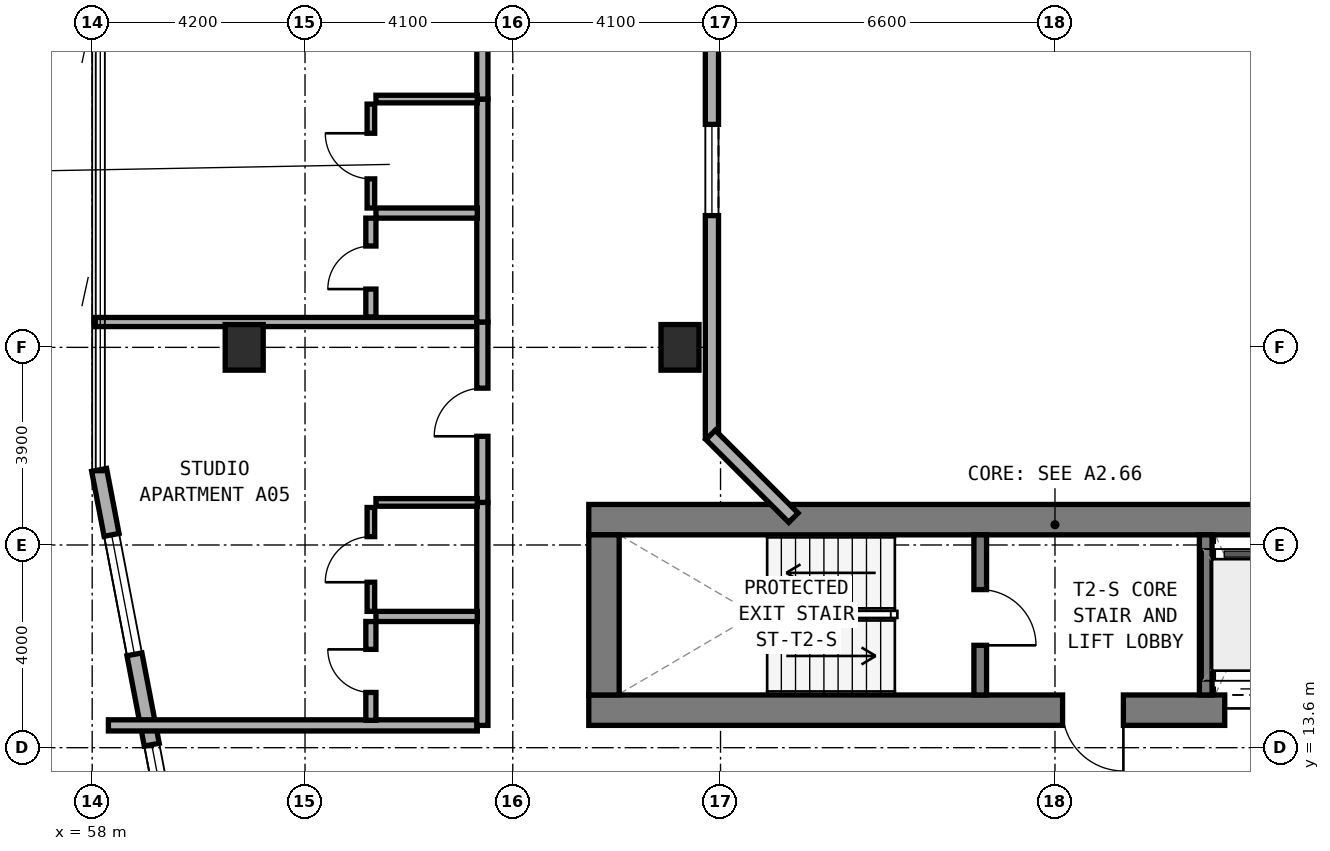
"""IFC4 building model, lengths in metres.
Left out: names, types, materials, properties, quantities, classifications, styles, units other than length and angle.
Written with IfcOpenShell. Run it as: python <this file> out.ifc"""

import sys

from ifc_helpers import new_model, si_unit, direction, frame, frame_2d, origin, origin_2d, place, context, subcontext, project, spatial, rectangle, extrude, element, fill, save


model = new_model("IFC4")
c1 = context("Model", 3, precision=1e-05, world=origin(), true_north=direction((0.0, 1.0)))
c2 = subcontext(c1, "Body", "Model", "MODEL_VIEW")
j1 = project(units=[si_unit("LENGTHUNIT", "METRE"), si_unit("PLANEANGLEUNIT", "RADIAN")], contexts=[c1])
p1 = place(None, origin())
s1 = spatial("IfcSite", under=j1, at=p1, CompositionType="ELEMENT")
p2 = place(p1, origin())
s2 = spatial("IfcBuilding", under=s1, at=p2, CompositionType="ELEMENT")
p3 = place(p2, frame((0.0, 0.0, 48.5)))
s3 = spatial("IfcBuildingStorey", under=s2, at=p3, CompositionType="ELEMENT", Elevation=48.5)
p4 = place(p3, frame((67.8, 14.34, 0.0), z_axis=(0.0, 0.0, 1.0), x_axis=(1.0, 0.0, 0.0)))
e1 = element("IfcWall", 1, at=p4, inside=s3, PredefinedType="SHEAR", context=c2, shape_type="SweptSolid", body=[
    extrude(rectangle(XDim=18.6, YDim=0.6, at=frame_2d((9.3, 0.0))), origin(), (0.0, 0.0, 1.0), 3.5),
])
p5 = place(p4, frame((9.35, 0.0, 0.0)))
e2 = element("IfcOpeningElement", 2, at=p5, cuts=e1, PredefinedType="OPENING", context=c2, shape_type="SweptSolid", body=[
    extrude(rectangle(XDim=1.2, YDim=2.15, at=frame_2d((0.6, 1.075))), frame((0.0, 0.31, 0.0), z_axis=(0.0, -1.0, 0.0), x_axis=(1.0, 0.0, 0.0)), (0.0, 0.0, 1.0), 0.62),
])
p6 = place(p4, frame((16.95, 0.0, 0.0)))
e3 = element("IfcOpeningElement", 3, at=p6, cuts=e1, PredefinedType="OPENING", context=c2, shape_type="SweptSolid", body=[
    extrude(rectangle(XDim=0.85, YDim=2.1, at=frame_2d((0.425, 1.05))), frame((0.0, 0.31, 0.0), z_axis=(0.0, -1.0, 0.0), x_axis=(1.0, 0.0, 0.0)), (0.0, 0.0, 1.0), 0.62),
])
p7 = place(p4, frame((12.55, 0.0, 0.0)))
e4 = element("IfcOpeningElement", 4, at=p7, cuts=e1, PredefinedType="OPENING", context=c2, shape_type="SweptSolid", body=[
    extrude(rectangle(XDim=1.1, YDim=2.15, at=frame_2d((0.55, 1.075))), frame((0.0, 0.31, 0.0), z_axis=(0.0, -1.0, 0.0), x_axis=(1.0, 0.0, 0.0)), (0.0, 0.0, 1.0), 0.62),
])
p8 = place(p4, frame((14.15, 0.0, 0.0)))
e5 = element("IfcOpeningElement", 5, at=p8, cuts=e1, PredefinedType="OPENING", context=c2, shape_type="SweptSolid", body=[
    extrude(rectangle(XDim=1.1, YDim=2.15, at=frame_2d((0.55, 1.075))), frame((0.0, 0.31, 0.0), z_axis=(0.0, -1.0, 0.0), x_axis=(1.0, 0.0, 0.0)), (0.0, 0.0, 1.0), 0.62),
])
p9 = place(p3, frame((67.8, 18.1, 0.0), z_axis=(0.0, 0.0, 1.0), x_axis=(1.0, 0.0, 0.0)))
e6 = element("IfcWall", 6, at=p9, inside=s3, PredefinedType="SHEAR", context=c2, shape_type="SweptSolid", body=[
    extrude(rectangle(XDim=18.6, YDim=0.6, at=frame_2d((9.3, 0.0))), origin(), (0.0, 0.0, 1.0), 3.5),
])
p10 = place(p3, frame((68.1, 14.64, 0.0), z_axis=(0.0, 0.0, 1.0), x_axis=(0.0, 1.0, 0.0)))
e7 = element("IfcWall", 7, at=p10, inside=s3, PredefinedType="SHEAR", context=c2, shape_type="SweptSolid", body=[
    extrude(rectangle(XDim=3.16, YDim=0.6, at=frame_2d((1.58, 0.0))), origin(), (0.0, 0.0, 1.0), 3.5),
])
p11 = place(p3, frame((75.525, 14.64, 0.0), z_axis=(0.0, 0.0, 1.0), x_axis=(0.0, 1.0, 0.0)))
e8 = element("IfcWall", 8, at=p11, inside=s3, PredefinedType="STANDARD", context=c2, shape_type="SweptSolid", body=[
    extrude(rectangle(XDim=3.16, YDim=0.25, at=frame_2d((1.58, 0.0))), origin(), (0.0, 0.0, 1.0), 3.25),
])
p12 = place(p11, frame((0.98, 0.0, 0.0)))
e9 = element("IfcOpeningElement", 9, at=p12, cuts=e8, PredefinedType="OPENING", context=c2, shape_type="SweptSolid", body=[
    extrude(rectangle(XDim=1.1, YDim=2.15, at=frame_2d((0.55, 1.075))), frame((0.0, 0.135, 0.0), z_axis=(0.0, -1.0, 0.0), x_axis=(1.0, 0.0, 0.0)), (0.0, 0.0, 1.0), 0.27),
])
p13 = place(p3, frame((79.975, 14.64, 0.0), z_axis=(0.0, 0.0, 1.0), x_axis=(0.0, 1.0, 0.0)))
e10 = element("IfcWall", 10, at=p13, inside=s3, PredefinedType="STANDARD", context=c2, shape_type="SweptSolid", body=[
    extrude(rectangle(XDim=3.16, YDim=0.25, at=frame_2d((1.58, 0.0))), origin(), (0.0, 0.0, 1.0), 3.25),
])
for number, where, z_axis, x_axis in (
    (11, (61.0, 21.5, 0.0), (0.0, 0.0, 1.0), (1.0, 0.0, 0.0)),
    (12, (69.6, 21.5, 0.0), (0.0, 0.0, 1.0), (1.0, 0.0, 0.0)),
):
    element("IfcColumn", number, at=place(p3, frame(where, z_axis=z_axis, x_axis=x_axis)), inside=s3, PredefinedType="COLUMN", context=c2, shape_type="SweptSolid", body=[
        extrude(rectangle(XDim=0.75, YDim=0.9, at=origin_2d()), origin(), (0.0, 0.0, 1.0), 3.5),
    ])
p14 = place(p3, frame((58.137, 19.082, 0.0), z_axis=(0.0, 0.0, 1.0), x_axis=(0.188087874316, -0.982152203854, 0.0)))
e13 = element("IfcWall", 13, at=p14, inside=s3, PredefinedType="STANDARD", context=c2, shape_type="SweptSolid", body=[
    extrude(rectangle(XDim=9.634, YDim=0.3, at=frame_2d((4.817, 0.0))), origin(), (0.0, 0.0, 1.0), 3.25),
])
p15 = place(p14, frame((1.306, 0.0, 0.8)))
e14 = element("IfcOpeningElement", 14, at=p15, cuts=e13, PredefinedType="OPENING", context=c2, shape_type="SweptSolid", body=[
    extrude(rectangle(XDim=2.4, YDim=1.6, at=frame_2d((1.2, 0.8))), frame((0.0, 0.16, 0.0), z_axis=(0.0, -1.0, 0.0), x_axis=(1.0, 0.0, 0.0)), (0.0, 0.0, 1.0), 0.32),
])
p16 = place(p14, frame((5.521, 0.0, 0.85)))
e15 = element("IfcOpeningElement", 15, at=p16, cuts=e13, PredefinedType="OPENING", context=c2, shape_type="SweptSolid", body=[
    extrude(rectangle(XDim=1.2, YDim=1.5, at=frame_2d((0.6, 0.75))), frame((0.0, 0.16, 0.0), z_axis=(0.0, -1.0, 0.0), x_axis=(1.0, 0.0, 0.0)), (0.0, 0.0, 1.0), 0.32),
])
p17 = place(p14, frame((7.682, 0.0, 0.85)))
e16 = element("IfcOpeningElement", 16, at=p17, cuts=e13, PredefinedType="OPENING", context=c2, shape_type="SweptSolid", body=[
    extrude(rectangle(XDim=1.5, YDim=1.5, at=frame_2d((0.75, 0.75))), frame((0.0, 0.16, 0.0), z_axis=(0.0, -1.0, 0.0), x_axis=(1.0, 0.0, 0.0)), (0.0, 0.0, 1.0), 0.32),
])
p18 = place(p3, frame((70.23, 30.29, 0.0), z_axis=(0.0, 0.0, 1.0), x_axis=(0.0, -1.0, 0.0)))
e17 = element("IfcWall", 17, at=p18, inside=s3, PredefinedType="STANDARD", context=c2, shape_type="SweptSolid", body=[
    extrude(rectangle(XDim=10.58, YDim=0.26, at=frame_2d((5.29, 0.0))), origin(), (0.0, 0.0, 1.0), 3.25),
])
p19 = place(p18, frame((4.39, 0.0, 0.85)))
e18 = element("IfcOpeningElement", 18, at=p19, cuts=e17, PredefinedType="OPENING", context=c2, shape_type="SweptSolid", body=[
    extrude(rectangle(XDim=1.8, YDim=1.5, at=frame_2d((0.9, 0.75))), frame((0.0, 0.14, 0.0), z_axis=(0.0, -1.0, 0.0), x_axis=(1.0, 0.0, 0.0)), (0.0, 0.0, 1.0), 0.28),
])
p20 = place(p3, frame((70.204, 19.772, 0.0), z_axis=(0.0, 0.0, 1.0), x_axis=(0.707053950914, -0.707159607512, 0.0)))
e19 = element("IfcWall", 19, at=p20, inside=s3, PredefinedType="STANDARD", context=c2, shape_type="SweptSolid", body=[
    extrude(rectangle(XDim=2.311, YDim=0.26, at=frame_2d((1.155, 0.0))), origin(), (0.0, 0.0, 1.0), 3.25),
])
p21 = place(p3, frame((58.32, 14.04, 0.0), z_axis=(0.0, 0.0, 1.0), x_axis=(1.0, 0.0, 0.0)))
e20 = element("IfcWall", 20, at=p21, inside=s3, PredefinedType="SOLIDWALL", context=c2, shape_type="SweptSolid", body=[
    extrude(rectangle(XDim=7.28, YDim=0.22, at=frame_2d((3.64, 0.0))), origin(), (0.0, 0.0, 1.0), 2.865),
])
p22 = place(p3, frame((58.06, 22.0, 0.0), z_axis=(0.0, 0.0, 1.0), x_axis=(1.0, 0.0, 0.0)))
e21 = element("IfcWall", 21, at=p22, inside=s3, PredefinedType="SOLIDWALL", context=c2, shape_type="SweptSolid", body=[
    extrude(rectangle(XDim=7.64, YDim=0.18, at=frame_2d((3.82, 0.0))), origin(), (0.0, 0.0, 1.0), 2.865),
])
p23 = place(p3, frame((65.7, 14.04, 0.0), z_axis=(0.0, 0.0, 1.0), x_axis=(0.0, 1.0, 0.0)))
e22 = element("IfcWall", 22, at=p23, inside=s3, PredefinedType="SOLIDWALL", context=c2, shape_type="SweptSolid", body=[
    extrude(rectangle(XDim=4.4, YDim=0.22, at=frame_2d((2.2, 0.0))), origin(), (0.0, 0.0, 1.0), 3.22),
])
p24 = place(p3, frame((65.7, 18.44, 0.0), z_axis=(0.0, 0.0, 1.0), x_axis=(0.0, 1.0, 0.0)))
e23 = element("IfcWall", 23, at=p24, inside=s3, PredefinedType="SOLIDWALL", context=c2, shape_type="SweptSolid", body=[
    extrude(rectangle(XDim=3.56, YDim=0.22, at=frame_2d((1.78, 0.0))), origin(), (0.0, 0.0, 1.0), 2.725),
])
p25 = place(p24, frame((1.305, 0.0, 0.0)))
e24 = element("IfcOpeningElement", 24, at=p25, cuts=e23, PredefinedType="OPENING", context=c2, shape_type="SweptSolid", body=[
    extrude(rectangle(XDim=0.95, YDim=2.1, at=frame_2d((0.475, 1.05))), frame((0.0, 0.12, 0.0), z_axis=(0.0, -1.0, 0.0), x_axis=(1.0, 0.0, 0.0)), (0.0, 0.0, 1.0), 0.24),
])
p26 = place(p3, frame((63.6, 16.19, 0.0), z_axis=(0.0, 0.0, 1.0), x_axis=(1.0, 0.0, 0.0)))
e25 = element("IfcWall", 25, at=p26, inside=s3, PredefinedType="PLUMBINGWALL", context=c2, shape_type="SweptSolid", body=[
    extrude(rectangle(XDim=2.0, YDim=0.2, at=frame_2d((1.0, 0.0))), origin(), (0.0, 0.0, 1.0), 3.22),
])
p27 = place(p3, frame((63.6, 18.44, 0.0), z_axis=(0.0, 0.0, 1.0), x_axis=(1.0, 0.0, 0.0)))
e26 = element("IfcWall", 26, at=p27, inside=s3, PredefinedType="PARTITIONING", context=c2, shape_type="SweptSolid", body=[
    extrude(rectangle(XDim=2.0, YDim=0.15, at=frame_2d((1.0, 0.0))), origin(), (0.0, 0.0, 1.0), 3.22),
])
p28 = place(p3, frame((63.5, 14.14, 0.0), z_axis=(0.0, 0.0, 1.0), x_axis=(0.0, 1.0, 0.0)))
e27 = element("IfcWall", 27, at=p28, inside=s3, PredefinedType="PLUMBINGWALL", context=c2, shape_type="SweptSolid", body=[
    extrude(rectangle(XDim=1.95, YDim=0.2, at=frame_2d((0.975, 0.0))), origin(), (0.0, 0.0, 1.0), 3.22),
])
p29 = place(p28, frame((0.55, 0.0, 0.0)))
e28 = element("IfcOpeningElement", 28, at=p29, cuts=e27, PredefinedType="OPENING", context=c2, shape_type="SweptSolid", body=[
    extrude(rectangle(XDim=0.85, YDim=2.1, at=frame_2d((0.425, 1.05))), frame((0.0, 0.11, 0.0), z_axis=(0.0, -1.0, 0.0), x_axis=(1.0, 0.0, 0.0)), (0.0, 0.0, 1.0), 0.22),
])
p30 = place(p3, frame((63.5, 16.29, 0.0), z_axis=(0.0, 0.0, 1.0), x_axis=(0.0, 1.0, 0.0)))
e29 = element("IfcWall", 29, at=p30, inside=s3, PredefinedType="PARTITIONING", context=c2, shape_type="SweptSolid", body=[
    extrude(rectangle(XDim=2.05, YDim=0.15, at=frame_2d((1.025, 0.0))), origin(), (0.0, 0.0, 1.0), 3.22),
])
p31 = place(p30, frame((0.575, 0.0, 0.0)))
e30 = element("IfcOpeningElement", 30, at=p31, cuts=e29, PredefinedType="OPENING", context=c2, shape_type="SweptSolid", body=[
    extrude(rectangle(XDim=0.9, YDim=2.1, at=frame_2d((0.45, 1.05))), frame((0.0, 0.085, 0.0), z_axis=(0.0, -1.0, 0.0), x_axis=(1.0, 0.0, 0.0)), (0.0, 0.0, 1.0), 0.17),
])
p32 = place(p3, frame((65.7, 22.0, 0.0), z_axis=(0.0, 0.0, 1.0), x_axis=(0.0, 1.0, 0.0)))
e31 = element("IfcWall", 31, at=p32, inside=s3, PredefinedType="SOLIDWALL", context=c2, shape_type="SweptSolid", body=[
    extrude(rectangle(XDim=4.4, YDim=0.22, at=frame_2d((2.2, 0.0))), origin(), (0.0, 0.0, 1.0), 3.22),
])
p33 = place(p3, frame((65.7, 26.4, 0.0), z_axis=(0.0, 0.0, 1.0), x_axis=(0.0, 1.0, 0.0)))
e32 = element("IfcWall", 32, at=p33, inside=s3, PredefinedType="SOLIDWALL", context=c2, shape_type="SweptSolid", body=[
    extrude(rectangle(XDim=9.56, YDim=0.22, at=frame_2d((4.78, 0.0))), origin(), (0.0, 0.0, 1.0), 2.725),
])
p34 = place(p33, frame((2.405, 0.0, 0.0)))
e33 = element("IfcOpeningElement", 33, at=p34, cuts=e32, PredefinedType="OPENING", context=c2, shape_type="SweptSolid", body=[
    extrude(rectangle(XDim=0.95, YDim=2.1, at=frame_2d((0.475, 1.05))), frame((0.0, 0.12, 0.0), z_axis=(0.0, -1.0, 0.0), x_axis=(1.0, 0.0, 0.0)), (0.0, 0.0, 1.0), 0.24),
])
p35 = place(p3, frame((63.6, 24.15, 0.0), z_axis=(0.0, 0.0, 1.0), x_axis=(1.0, 0.0, 0.0)))
e34 = element("IfcWall", 34, at=p35, inside=s3, PredefinedType="PLUMBINGWALL", context=c2, shape_type="SweptSolid", body=[
    extrude(rectangle(XDim=2.0, YDim=0.2, at=frame_2d((1.0, 0.0))), origin(), (0.0, 0.0, 1.0), 3.22),
])
p36 = place(p3, frame((63.6, 26.4, 0.0), z_axis=(0.0, 0.0, 1.0), x_axis=(1.0, 0.0, 0.0)))
e35 = element("IfcWall", 35, at=p36, inside=s3, PredefinedType="PARTITIONING", context=c2, shape_type="SweptSolid", body=[
    extrude(rectangle(XDim=2.0, YDim=0.15, at=frame_2d((1.0, 0.0))), origin(), (0.0, 0.0, 1.0), 3.22),
])
p37 = place(p3, frame((63.5, 22.1, 0.0), z_axis=(0.0, 0.0, 1.0), x_axis=(0.0, 1.0, 0.0)))
e36 = element("IfcWall", 36, at=p37, inside=s3, PredefinedType="PLUMBINGWALL", context=c2, shape_type="SweptSolid", body=[
    extrude(rectangle(XDim=1.95, YDim=0.2, at=frame_2d((0.975, 0.0))), origin(), (0.0, 0.0, 1.0), 3.22),
])
p38 = place(p37, frame((0.55, 0.0, 0.0)))
e37 = element("IfcOpeningElement", 37, at=p38, cuts=e36, PredefinedType="OPENING", context=c2, shape_type="SweptSolid", body=[
    extrude(rectangle(XDim=0.85, YDim=2.1, at=frame_2d((0.425, 1.05))), frame((0.0, 0.11, 0.0), z_axis=(0.0, -1.0, 0.0), x_axis=(1.0, 0.0, 0.0)), (0.0, 0.0, 1.0), 0.22),
])
p39 = place(p3, frame((63.5, 24.25, 0.0), z_axis=(0.0, 0.0, 1.0), x_axis=(0.0, 1.0, 0.0)))
e38 = element("IfcWall", 38, at=p39, inside=s3, PredefinedType="PARTITIONING", context=c2, shape_type="SweptSolid", body=[
    extrude(rectangle(XDim=2.05, YDim=0.15, at=frame_2d((1.025, 0.0))), origin(), (0.0, 0.0, 1.0), 3.22),
])
p40 = place(p39, frame((0.575, 0.0, 0.0)))
e39 = element("IfcOpeningElement", 39, at=p40, cuts=e38, PredefinedType="OPENING", context=c2, shape_type="SweptSolid", body=[
    extrude(rectangle(XDim=0.9, YDim=2.1, at=frame_2d((0.45, 1.05))), frame((0.0, 0.085, 0.0), z_axis=(0.0, -1.0, 0.0), x_axis=(1.0, 0.0, 0.0)), (0.0, 0.0, 1.0), 0.17),
])
p41 = place(p15, origin())
e40 = element("IfcWindow", 40, at=p41, inside=s3, PartitioningType="SINGLE_PANEL", PredefinedType="WINDOW", context=c2, shape_type="SweptSolid", body=[
    extrude(rectangle(XDim=2.4, YDim=1.6, at=frame_2d((1.2, 0.8))), frame((0.0, 0.03, 0.0), z_axis=(0.0, -1.0, 0.0), x_axis=(1.0, 0.0, 0.0)), (0.0, 0.0, 1.0), 0.06),
])
fill(e14, e40)
p42 = place(p16, origin())
e41 = element("IfcWindow", 41, at=p42, inside=s3, PartitioningType="SINGLE_PANEL", PredefinedType="WINDOW", context=c2, shape_type="SweptSolid", body=[
    extrude(rectangle(XDim=1.2, YDim=1.5, at=frame_2d((0.6, 0.75))), frame((0.0, 0.03, 0.0), z_axis=(0.0, -1.0, 0.0), x_axis=(1.0, 0.0, 0.0)), (0.0, 0.0, 1.0), 0.06),
])
fill(e15, e41)
p43 = place(p19, origin())
e42 = element("IfcWindow", 42, at=p43, inside=s3, PartitioningType="SINGLE_PANEL", PredefinedType="WINDOW", context=c2, shape_type="SweptSolid", body=[
    extrude(rectangle(XDim=1.8, YDim=1.5, at=frame_2d((0.9, 0.75))), frame((0.0, 0.03, 0.0), z_axis=(0.0, -1.0, 0.0), x_axis=(1.0, 0.0, 0.0)), (0.0, 0.0, 1.0), 0.06),
])
fill(e18, e42)
p44 = place(p12, frame((1.1, 0.0, 0.0), z_axis=(0.0, 0.0, 1.0), x_axis=(-1.0, 0.0, 0.0)))
e43 = element("IfcDoor", 43, at=p44, inside=s3, OperationType="SINGLE_SWING_RIGHT", PredefinedType="DOOR", context=c2, shape_type="SweptSolid", body=[
    extrude(rectangle(XDim=1.1, YDim=2.15, at=frame_2d((0.55, 1.075))), frame((0.0, 0.025, 0.0), z_axis=(0.0, -1.0, 0.0), x_axis=(1.0, 0.0, 0.0)), (0.0, 0.0, 1.0), 0.05),
])
fill(e9, e43)
p45 = place(p5, frame((1.2, 0.0, 0.0), z_axis=(0.0, 0.0, 1.0), x_axis=(-1.0, 0.0, 0.0)))
e44 = element("IfcDoor", 44, at=p45, inside=s3, OperationType="SINGLE_SWING_LEFT", PredefinedType="DOOR", context=c2, shape_type="SweptSolid", body=[
    extrude(rectangle(XDim=1.2, YDim=2.15, at=frame_2d((0.6, 1.075))), frame((0.0, 0.025, 0.0), z_axis=(0.0, -1.0, 0.0), x_axis=(1.0, 0.0, 0.0)), (0.0, 0.0, 1.0), 0.05),
])
fill(e2, e44)
p46 = place(p7, frame((1.1, 0.0, 0.0), z_axis=(0.0, 0.0, 1.0), x_axis=(-1.0, 0.0, 0.0)))
e45 = element("IfcDoor", 45, at=p46, inside=s3, OperationType="DOUBLE_DOOR_SLIDING", PredefinedType="DOOR", context=c2, shape_type="SweptSolid", body=[
    extrude(rectangle(XDim=1.1, YDim=2.15, at=frame_2d((0.55, 1.075))), frame((0.0, 0.025, 0.0), z_axis=(0.0, -1.0, 0.0), x_axis=(1.0, 0.0, 0.0)), (0.0, 0.0, 1.0), 0.05),
])
fill(e4, e45)
p47 = place(p25, origin())
e46 = element("IfcDoor", 46, at=p47, inside=s3, OperationType="SINGLE_SWING_LEFT", PredefinedType="DOOR", context=c2, shape_type="SweptSolid", body=[
    extrude(rectangle(XDim=0.95, YDim=2.1, at=frame_2d((0.475, 1.05))), frame((0.0, 0.025, 0.0), z_axis=(0.0, -1.0, 0.0), x_axis=(1.0, 0.0, 0.0)), (0.0, 0.0, 1.0), 0.05),
])
fill(e24, e46)
p48 = place(p29, origin())
e47 = element("IfcDoor", 47, at=p48, inside=s3, OperationType="SINGLE_SWING_RIGHT", PredefinedType="DOOR", context=c2, shape_type="SweptSolid", body=[
    extrude(rectangle(XDim=0.85, YDim=2.1, at=frame_2d((0.425, 1.05))), frame((0.0, 0.025, 0.0), z_axis=(0.0, -1.0, 0.0), x_axis=(1.0, 0.0, 0.0)), (0.0, 0.0, 1.0), 0.05),
])
fill(e28, e47)
p49 = place(p31, origin())
e48 = element("IfcDoor", 48, at=p49, inside=s3, OperationType="SINGLE_SWING_LEFT", PredefinedType="DOOR", context=c2, shape_type="SweptSolid", body=[
    extrude(rectangle(XDim=0.9, YDim=2.1, at=frame_2d((0.45, 1.05))), frame((0.0, 0.025, 0.0), z_axis=(0.0, -1.0, 0.0), x_axis=(1.0, 0.0, 0.0)), (0.0, 0.0, 1.0), 0.05),
])
fill(e30, e48)
p50 = place(p38, origin())
e49 = element("IfcDoor", 49, at=p50, inside=s3, OperationType="SINGLE_SWING_LEFT", PredefinedType="DOOR", context=c2, shape_type="SweptSolid", body=[
    extrude(rectangle(XDim=0.85, YDim=2.1, at=frame_2d((0.425, 1.05))), frame((0.0, 0.025, 0.0), z_axis=(0.0, -1.0, 0.0), x_axis=(1.0, 0.0, 0.0)), (0.0, 0.0, 1.0), 0.05),
])
fill(e37, e49)
p51 = place(p40, origin())
e50 = element("IfcDoor", 50, at=p51, inside=s3, OperationType="SINGLE_SWING_RIGHT", PredefinedType="DOOR", context=c2, shape_type="SweptSolid", body=[
    extrude(rectangle(XDim=0.9, YDim=2.1, at=frame_2d((0.45, 1.05))), frame((0.0, 0.025, 0.0), z_axis=(0.0, -1.0, 0.0), x_axis=(1.0, 0.0, 0.0)), (0.0, 0.0, 1.0), 0.05),
])
fill(e39, e50)
save(model, sys.argv[1])
